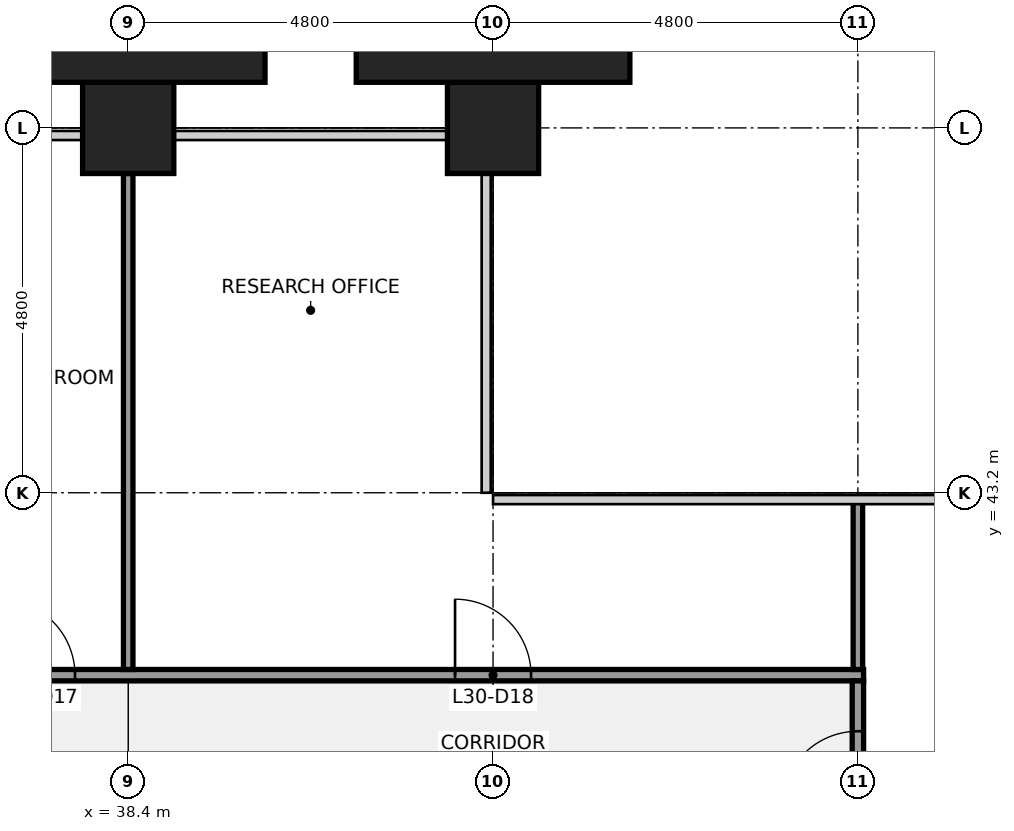
"""IFC4 building model, lengths in metres.
Left out: names, types, materials, properties, quantities, classifications, styles, units other than length and angle.
Written with IfcOpenShell. Run it as: python <this file> out.ifc"""

import sys

from ifc_helpers import new_model, si_unit, direction, frame, frame_2d, origin, origin_2d, place, context, subcontext, project, spatial, rectangle, extrude, element, fill, save


model = new_model("IFC4")
c1 = context("Model", 3, precision=1e-05, world=origin(), true_north=direction((0.0, 1.0)))
c2 = subcontext(c1, "Body", "Model", "MODEL_VIEW")
j1 = project(units=[si_unit("LENGTHUNIT", "METRE"), si_unit("PLANEANGLEUNIT", "RADIAN")], contexts=[c1])
p1 = place(None, origin())
s1 = spatial("IfcSite", under=j1, at=p1, CompositionType="ELEMENT")
p2 = place(p1, origin())
s2 = spatial("IfcBuilding", under=s1, at=p2, CompositionType="ELEMENT")
p3 = place(p2, frame((0.0, 0.0, 140.1)))
s3 = spatial("IfcBuildingStorey", under=s2, at=p3, CompositionType="ELEMENT", Elevation=140.1)
for number, where, z_axis, x_axis in (
    (1, (38.4, 48.0, 0.0), (0.0, 0.0, 1.0), (1.0, 0.0, 0.0)),
    (2, (43.2, 48.0, 0.0), (0.0, 0.0, 1.0), (1.0, 0.0, 0.0)),
):
    element("IfcColumn", number, at=place(p3, frame(where, z_axis=z_axis, x_axis=x_axis)), inside=s3, PredefinedType="COLUMN", context=c2, shape_type="SweptSolid", body=[
        extrude(rectangle(XDim=1.2, YDim=1.2, at=origin_2d()), origin(), (0.0, 0.0, 1.0), 4.0),
    ])
p4 = place(p3, frame((9.525, 40.8, 0.0), z_axis=(0.0, 0.0, 1.0), x_axis=(1.0, 0.0, 0.0)))
e3 = element("IfcWall", 3, at=p4, inside=s3, PredefinedType="PARTITIONING", context=c2, shape_type="SweptSolid", body=[
    extrude(rectangle(XDim=38.55, YDim=0.15, at=frame_2d((19.275, 0.0))), origin(), (0.0, 0.0, 1.0), 2.936),
])
p5 = place(p4, frame((4.375, 0.0, 0.0)))
e4 = element("IfcOpeningElement", 4, at=p5, cuts=e3, PredefinedType="OPENING", context=c2, shape_type="SweptSolid", body=[
    extrude(rectangle(XDim=1.0, YDim=2.1, at=frame_2d((0.5, 1.05))), frame((0.0, 0.085, 0.0), z_axis=(0.0, -1.0, 0.0), x_axis=(1.0, 0.0, 0.0)), (0.0, 0.0, 1.0), 0.17),
])
p6 = place(p4, frame((12.775, 0.0, 0.0)))
e5 = element("IfcOpeningElement", 5, at=p6, cuts=e3, PredefinedType="OPENING", context=c2, shape_type="SweptSolid", body=[
    extrude(rectangle(XDim=1.0, YDim=2.1, at=frame_2d((0.5, 1.05))), frame((0.0, 0.085, 0.0), z_axis=(0.0, -1.0, 0.0), x_axis=(1.0, 0.0, 0.0)), (0.0, 0.0, 1.0), 0.17),
])
p7 = place(p4, frame((17.575, 0.0, 0.0)))
e6 = element("IfcOpeningElement", 6, at=p7, cuts=e3, PredefinedType="OPENING", context=c2, shape_type="SweptSolid", body=[
    extrude(rectangle(XDim=1.0, YDim=2.1, at=frame_2d((0.5, 1.05))), frame((0.0, 0.085, 0.0), z_axis=(0.0, -1.0, 0.0), x_axis=(1.0, 0.0, 0.0)), (0.0, 0.0, 1.0), 0.17),
])
p8 = place(p4, frame((19.975, 0.0, 0.0)))
e7 = element("IfcOpeningElement", 7, at=p8, cuts=e3, PredefinedType="OPENING", context=c2, shape_type="SweptSolid", body=[
    extrude(rectangle(XDim=1.0, YDim=2.1, at=frame_2d((0.5, 1.05))), frame((0.0, 0.085, 0.0), z_axis=(0.0, -1.0, 0.0), x_axis=(1.0, 0.0, 0.0)), (0.0, 0.0, 1.0), 0.17),
])
p9 = place(p4, frame((23.575, 0.0, 0.0)))
e8 = element("IfcOpeningElement", 8, at=p9, cuts=e3, PredefinedType="OPENING", context=c2, shape_type="SweptSolid", body=[
    extrude(rectangle(XDim=1.0, YDim=2.1, at=frame_2d((0.5, 1.05))), frame((0.0, 0.085, 0.0), z_axis=(0.0, -1.0, 0.0), x_axis=(1.0, 0.0, 0.0)), (0.0, 0.0, 1.0), 0.17),
])
p10 = place(p4, frame((27.175, 0.0, 0.0)))
e9 = element("IfcOpeningElement", 9, at=p10, cuts=e3, PredefinedType="OPENING", context=c2, shape_type="SweptSolid", body=[
    extrude(rectangle(XDim=1.0, YDim=2.1, at=frame_2d((0.5, 1.05))), frame((0.0, 0.085, 0.0), z_axis=(0.0, -1.0, 0.0), x_axis=(1.0, 0.0, 0.0)), (0.0, 0.0, 1.0), 0.17),
])
p11 = place(p4, frame((33.175, 0.0, 0.0)))
e10 = element("IfcOpeningElement", 10, at=p11, cuts=e3, PredefinedType="OPENING", context=c2, shape_type="SweptSolid", body=[
    extrude(rectangle(XDim=1.0, YDim=2.1, at=frame_2d((0.5, 1.05))), frame((0.0, 0.085, 0.0), z_axis=(0.0, -1.0, 0.0), x_axis=(1.0, 0.0, 0.0)), (0.0, 0.0, 1.0), 0.17),
])
p12 = place(p3, frame((38.4, 40.875, 0.0), z_axis=(0.0, 0.0, 1.0), x_axis=(0.0, 1.0, 0.0)))
e11 = element("IfcWall", 11, at=p12, inside=s3, PredefinedType="PARTITIONING", context=c2, shape_type="SweptSolid", body=[
    extrude(rectangle(XDim=6.525, YDim=0.125, at=frame_2d((3.262, 0.0))), origin(), (0.0, 0.0, 1.0), 2.936),
])
p13 = place(p3, frame((48.0, 40.875, 0.0), z_axis=(0.0, 0.0, 1.0), x_axis=(0.0, 1.0, 0.0)))
e12 = element("IfcWall", 12, at=p13, inside=s3, PredefinedType="PARTITIONING", context=c2, shape_type="SweptSolid", body=[
    extrude(rectangle(XDim=2.225, YDim=0.125, at=frame_2d((1.113, 0.0))), origin(), (0.0, 0.0, 1.0), 2.936),
])
p14 = place(p3, frame((48.0, 38.4, 0.0), z_axis=(0.0, 0.0, 1.0), x_axis=(0.0, 1.0, 0.0)))
e13 = element("IfcWall", 13, at=p14, inside=s3, PredefinedType="PARTITIONING", context=c2, shape_type="SweptSolid", body=[
    extrude(rectangle(XDim=2.325, YDim=0.15, at=frame_2d((1.163, 0.0))), origin(), (0.0, 0.0, 1.0), 2.936),
])
p15 = place(p14, frame((0.663, 0.0, 0.0)))
e14 = element("IfcOpeningElement", 14, at=p15, cuts=e13, PredefinedType="OPENING", context=c2, shape_type="SweptSolid", body=[
    extrude(rectangle(XDim=1.0, YDim=2.1, at=frame_2d((0.5, 1.05))), frame((0.0, 0.085, 0.0), z_axis=(0.0, -1.0, 0.0), x_axis=(1.0, 0.0, 0.0)), (0.0, 0.0, 1.0), 0.17),
])
for number, where, z_axis, x_axis in (
    (15, (38.4, 49.05, 0.0), (0.0, 0.0, 1.0), (1.0, 0.0, 0.0)),
    (16, (43.2, 49.05, 0.0), (0.0, 0.0, 1.0), (1.0, 0.0, 0.0)),
):
    element("IfcColumn", number, at=place(p3, frame(where, z_axis=z_axis, x_axis=x_axis)), inside=s3, PredefinedType="PILASTER", context=c2, shape_type="SweptSolid", body=[
        extrude(rectangle(XDim=3.6, YDim=0.9, at=origin_2d()), origin(), (0.0, 0.0, 1.0), 4.0),
    ])
p16 = place(p10, origin())
e17 = element("IfcDoor", 17, at=p16, inside=s3, OperationType="SINGLE_SWING_LEFT", PredefinedType="DOOR", context=c2, shape_type="SweptSolid", body=[
    extrude(rectangle(XDim=1.0, YDim=2.1, at=frame_2d((0.5, 1.05))), frame((0.0, 0.025, 0.0), z_axis=(0.0, -1.0, 0.0), x_axis=(1.0, 0.0, 0.0)), (0.0, 0.0, 1.0), 0.05),
])
fill(e9, e17)
p17 = place(p11, origin())
e18 = element("IfcDoor", 18, at=p17, inside=s3, OperationType="SINGLE_SWING_LEFT", PredefinedType="DOOR", context=c2, shape_type="SweptSolid", body=[
    extrude(rectangle(XDim=1.0, YDim=2.1, at=frame_2d((0.5, 1.05))), frame((0.0, 0.025, 0.0), z_axis=(0.0, -1.0, 0.0), x_axis=(1.0, 0.0, 0.0)), (0.0, 0.0, 1.0), 0.05),
])
fill(e10, e18)
p18 = place(p15, origin())
e19 = element("IfcDoor", 19, at=p18, inside=s3, OperationType="SINGLE_SWING_LEFT", PredefinedType="DOOR", context=c2, shape_type="SweptSolid", body=[
    extrude(rectangle(XDim=1.0, YDim=2.1, at=frame_2d((0.5, 1.05))), frame((0.0, 0.025, 0.0), z_axis=(0.0, -1.0, 0.0), x_axis=(1.0, 0.0, 0.0)), (0.0, 0.0, 1.0), 0.05),
])
fill(e14, e19)
save(model, sys.argv[1])
